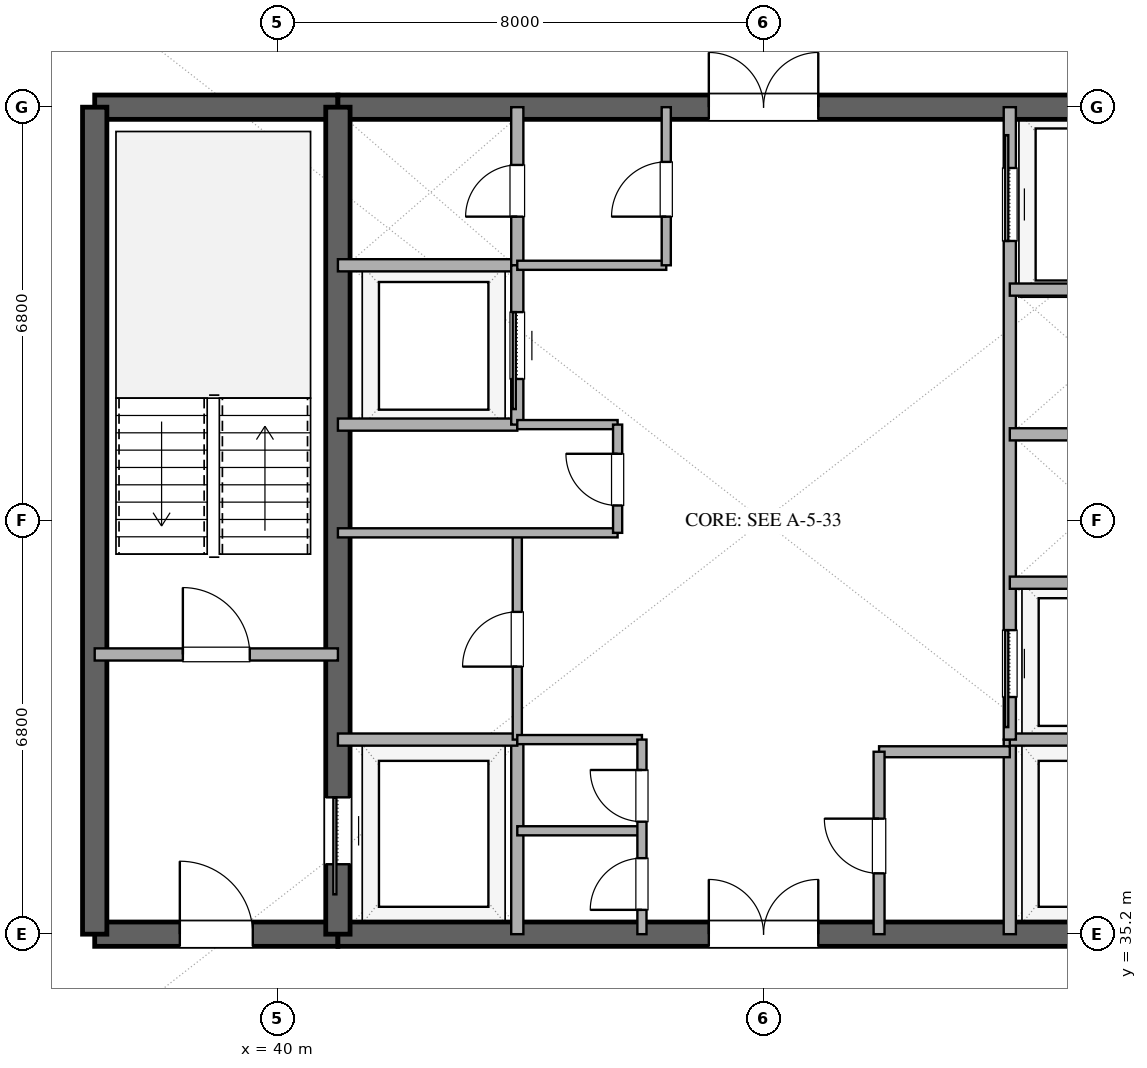
"""IFC4 building model, lengths in metres.
Left out: names, types, materials, properties, quantities, classifications, styles, units other than length and angle.
Written with IfcOpenShell. Run it as: python <this file> out.ifc"""

import sys

from ifc_helpers import new_model, si_unit, direction, frame, frame_2d, origin, place, context, subcontext, project, spatial, rectangle, extrude, element, fill, save


model = new_model("IFC4")
c1 = context("Model", 3, precision=1e-05, world=origin(), true_north=direction((0.0, 1.0)))
c2 = subcontext(c1, "Body", "Model", "MODEL_VIEW")
j1 = project(units=[si_unit("LENGTHUNIT", "METRE"), si_unit("PLANEANGLEUNIT", "RADIAN")], contexts=[c1])
p1 = place(None, origin())
s1 = spatial("IfcSite", under=j1, at=p1, CompositionType="ELEMENT")
p2 = place(p1, origin())
s2 = spatial("IfcBuilding", under=s1, at=p2, CompositionType="ELEMENT")
p3 = place(p2, frame((0.0, 0.0, 224.4)))
s3 = spatial("IfcBuildingStorey", under=s2, at=p3, CompositionType="ELEMENT", Elevation=224.4)
p4 = place(p3, frame((37.0, 35.2, 0.0), z_axis=(0.0, 0.0, 1.0), x_axis=(1.0, 0.0, 0.0)))
e1 = element("IfcWall", 1, at=p4, inside=s3, PredefinedType="SHEAR", context=c2, shape_type="SweptSolid", body=[
    extrude(rectangle(XDim=4.0, YDim=0.4, at=frame_2d((2.0, 0.0))), origin(), (0.0, 0.0, 1.0), 3.36),
])
p5 = place(p4, frame((1.4, 0.0, 0.0)))
e2 = element("IfcOpeningElement", 2, at=p5, cuts=e1, PredefinedType="OPENING", context=c2, shape_type="SweptSolid", body=[
    extrude(rectangle(XDim=1.2, YDim=2.15, at=frame_2d((0.6, 1.075))), frame((0.0, 0.21, 0.0), z_axis=(0.0, -1.0, 0.0), x_axis=(1.0, 0.0, 0.0)), (0.0, 0.0, 1.0), 0.42),
])
p6 = place(p3, frame((41.0, 35.2, 0.0), z_axis=(0.0, 0.0, 1.0), x_axis=(1.0, 0.0, 0.0)))
e3 = element("IfcWall", 3, at=p6, inside=s3, PredefinedType="SHEAR", context=c2, shape_type="SweptSolid", body=[
    extrude(rectangle(XDim=14.0, YDim=0.4, at=frame_2d((7.0, 0.0))), origin(), (0.0, 0.0, 1.0), 3.36),
])
p7 = place(p6, frame((6.1, 0.0, 0.0)))
e4 = element("IfcOpeningElement", 4, at=p7, cuts=e3, PredefinedType="OPENING", context=c2, shape_type="SweptSolid", body=[
    extrude(rectangle(XDim=1.8, YDim=2.25, at=frame_2d((0.9, 1.125))), frame((0.0, 0.21, 0.0), z_axis=(0.0, -1.0, 0.0), x_axis=(1.0, 0.0, 0.0)), (0.0, 0.0, 1.0), 0.42),
])
p8 = place(p3, frame((37.0, 48.8, 0.0), z_axis=(0.0, 0.0, 1.0), x_axis=(1.0, 0.0, 0.0)))
e5 = element("IfcWall", 5, at=p8, inside=s3, PredefinedType="SHEAR", context=c2, shape_type="SweptSolid", body=[
    extrude(rectangle(XDim=4.0, YDim=0.4, at=frame_2d((2.0, 0.0))), origin(), (0.0, 0.0, 1.0), 3.36),
])
p9 = place(p3, frame((41.0, 48.8, 0.0), z_axis=(0.0, 0.0, 1.0), x_axis=(1.0, 0.0, 0.0)))
e6 = element("IfcWall", 6, at=p9, inside=s3, PredefinedType="SHEAR", context=c2, shape_type="SweptSolid", body=[
    extrude(rectangle(XDim=14.0, YDim=0.4, at=frame_2d((7.0, 0.0))), origin(), (0.0, 0.0, 1.0), 3.36),
])
p10 = place(p9, frame((6.1, 0.0, 0.0)))
e7 = element("IfcOpeningElement", 7, at=p10, cuts=e6, PredefinedType="OPENING", context=c2, shape_type="SweptSolid", body=[
    extrude(rectangle(XDim=1.8, YDim=2.25, at=frame_2d((0.9, 1.125))), frame((0.0, 0.21, 0.0), z_axis=(0.0, -1.0, 0.0), x_axis=(1.0, 0.0, 0.0)), (0.0, 0.0, 1.0), 0.42),
])
p11 = place(p3, frame((37.0, 35.2, 0.0), z_axis=(0.0, 0.0, 1.0), x_axis=(0.0, 1.0, 0.0)))
e8 = element("IfcWall", 8, at=p11, inside=s3, PredefinedType="SHEAR", context=c2, shape_type="SweptSolid", body=[
    extrude(rectangle(XDim=13.6, YDim=0.4, at=frame_2d((6.8, 0.0))), origin(), (0.0, 0.0, 1.0), 3.36),
])
p12 = place(p3, frame((41.0, 35.2, 0.0), z_axis=(0.0, 0.0, 1.0), x_axis=(0.0, 1.0, 0.0)))
e9 = element("IfcWall", 9, at=p12, inside=s3, PredefinedType="SHEAR", context=c2, shape_type="SweptSolid", body=[
    extrude(rectangle(XDim=13.6, YDim=0.4, at=frame_2d((6.8, 0.0))), origin(), (0.0, 0.0, 1.0), 3.36),
])
p13 = place(p12, frame((1.15, 0.0, 0.0)))
e10 = element("IfcOpeningElement", 10, at=p13, cuts=e9, PredefinedType="OPENING", context=c2, shape_type="SweptSolid", body=[
    extrude(rectangle(XDim=1.1, YDim=2.2, at=frame_2d((0.55, 1.1))), frame((0.0, 0.21, 0.0), z_axis=(0.0, -1.0, 0.0), x_axis=(1.0, 0.0, 0.0)), (0.0, 0.0, 1.0), 0.42),
])
p14 = place(p3, frame((37.0, 39.8, 0.0), z_axis=(0.0, 0.0, 1.0), x_axis=(1.0, 0.0, 0.0)))
e11 = element("IfcWall", 11, at=p14, inside=s3, PredefinedType="SOLIDWALL", context=c2, shape_type="SweptSolid", body=[
    extrude(rectangle(XDim=4.0, YDim=0.2, at=frame_2d((2.0, 0.0))), origin(), (0.0, 0.0, 1.0), 2.72),
])
p15 = place(p14, frame((1.45, 0.0, 0.0)))
e12 = element("IfcOpeningElement", 12, at=p15, cuts=e11, PredefinedType="OPENING", context=c2, shape_type="SweptSolid", body=[
    extrude(rectangle(XDim=1.1, YDim=2.15, at=frame_2d((0.55, 1.075))), frame((0.0, 0.11, 0.0), z_axis=(0.0, -1.0, 0.0), x_axis=(1.0, 0.0, 0.0)), (0.0, 0.0, 1.0), 0.22),
])
p16 = place(p3, frame((43.95, 35.2, 0.0), z_axis=(0.0, 0.0, 1.0), x_axis=(0.0, 1.0, 0.0)))
e13 = element("IfcWall", 13, at=p16, inside=s3, PredefinedType="SOLIDWALL", context=c2, shape_type="SweptSolid", body=[
    extrude(rectangle(XDim=3.2, YDim=0.2, at=frame_2d((1.6, 0.0))), origin(), (0.0, 0.0, 1.0), 2.72),
])
p17 = place(p3, frame((41.0, 38.4, 0.0), z_axis=(0.0, 0.0, 1.0), x_axis=(1.0, 0.0, 0.0)))
e14 = element("IfcWall", 14, at=p17, inside=s3, PredefinedType="SOLIDWALL", context=c2, shape_type="SweptSolid", body=[
    extrude(rectangle(XDim=2.95, YDim=0.2, at=frame_2d((1.475, 0.0))), origin(), (0.0, 0.0, 1.0), 2.72),
])
p18 = place(p3, frame((52.05, 35.2, 0.0), z_axis=(0.0, 0.0, 1.0), x_axis=(0.0, 1.0, 0.0)))
e15 = element("IfcWall", 15, at=p18, inside=s3, PredefinedType="SOLIDWALL", context=c2, shape_type="SweptSolid", body=[
    extrude(rectangle(XDim=3.2, YDim=0.2, at=frame_2d((1.6, 0.0))), origin(), (0.0, 0.0, 1.0), 2.72),
])
for number, where, z_axis, x_axis in (
    (16, (52.05, 38.4, 0.0), (0.0, 0.0, 1.0), (1.0, 0.0, 0.0)),
    (17, (41.0, 46.2, 0.0), (0.0, 0.0, 1.0), (1.0, 0.0, 0.0)),
):
    element("IfcWall", number, at=place(p3, frame(where, z_axis=z_axis, x_axis=x_axis)), inside=s3, PredefinedType="SOLIDWALL", context=c2, shape_type="SweptSolid", body=[
        extrude(rectangle(XDim=2.95, YDim=0.2, at=frame_2d((1.475, 0.0))), origin(), (0.0, 0.0, 1.0), 2.72),
    ])
p19 = place(p3, frame((43.95, 46.2, 0.0), z_axis=(0.0, 0.0, 1.0), x_axis=(0.0, 1.0, 0.0)))
e18 = element("IfcWall", 18, at=p19, inside=s3, PredefinedType="SOLIDWALL", context=c2, shape_type="SweptSolid", body=[
    extrude(rectangle(XDim=2.6, YDim=0.2, at=frame_2d((1.3, 0.0))), origin(), (0.0, 0.0, 1.0), 2.72),
])
p20 = place(p19, frame((0.8, 0.0, 0.0)))
e19 = element("IfcOpeningElement", 19, at=p20, cuts=e18, PredefinedType="OPENING", context=c2, shape_type="SweptSolid", body=[
    extrude(rectangle(XDim=0.85, YDim=2.15, at=frame_2d((0.425, 1.075))), frame((0.0, 0.11, 0.0), z_axis=(0.0, -1.0, 0.0), x_axis=(1.0, 0.0, 0.0)), (0.0, 0.0, 1.0), 0.22),
])
p21 = place(p3, frame((41.0, 43.58, 0.0), z_axis=(0.0, 0.0, 1.0), x_axis=(1.0, 0.0, 0.0)))
e20 = element("IfcWall", 20, at=p21, inside=s3, PredefinedType="SOLIDWALL", context=c2, shape_type="SweptSolid", body=[
    extrude(rectangle(XDim=2.95, YDim=0.2, at=frame_2d((1.475, 0.0))), origin(), (0.0, 0.0, 1.0), 2.72),
])
p22 = place(p3, frame((43.95, 43.58, 0.0), z_axis=(0.0, 0.0, 1.0), x_axis=(0.0, 1.0, 0.0)))
e21 = element("IfcWall", 21, at=p22, inside=s3, PredefinedType="SOLIDWALL", context=c2, shape_type="SweptSolid", body=[
    extrude(rectangle(XDim=2.62, YDim=0.2, at=frame_2d((1.31, 0.0))), origin(), (0.0, 0.0, 1.0), 2.72),
])
p23 = place(p22, frame((0.75, 0.0, 0.0)))
e22 = element("IfcOpeningElement", 22, at=p23, cuts=e21, PredefinedType="OPENING", context=c2, shape_type="SweptSolid", body=[
    extrude(rectangle(XDim=1.1, YDim=2.2, at=frame_2d((0.55, 1.1))), frame((0.0, 0.11, 0.0), z_axis=(0.0, -1.0, 0.0), x_axis=(1.0, 0.0, 0.0)), (0.0, 0.0, 1.0), 0.22),
])
p24 = place(p3, frame((43.95, 38.4, 0.0), z_axis=(0.0, 0.0, 1.0), x_axis=(0.0, 1.0, 0.0)))
e23 = element("IfcWall", 23, at=p24, inside=s3, PredefinedType="PARTITIONING", context=c2, shape_type="SweptSolid", body=[
    extrude(rectangle(XDim=3.4, YDim=0.15, at=frame_2d((1.7, 0.0))), origin(), (0.0, 0.0, 1.0), 2.72),
])
p25 = place(p24, frame((1.2, 0.0, 0.0)))
e24 = element("IfcOpeningElement", 24, at=p25, cuts=e23, PredefinedType="OPENING", context=c2, shape_type="SweptSolid", body=[
    extrude(rectangle(XDim=0.9, YDim=2.15, at=frame_2d((0.45, 1.075))), frame((0.0, 0.085, 0.0), z_axis=(0.0, -1.0, 0.0), x_axis=(1.0, 0.0, 0.0)), (0.0, 0.0, 1.0), 0.17),
])
p26 = place(p3, frame((41.0, 41.8, 0.0), z_axis=(0.0, 0.0, 1.0), x_axis=(1.0, 0.0, 0.0)))
e25 = element("IfcWall", 25, at=p26, inside=s3, PredefinedType="PARTITIONING", context=c2, shape_type="SweptSolid", body=[
    extrude(rectangle(XDim=4.6, YDim=0.15, at=frame_2d((2.3, 0.0))), origin(), (0.0, 0.0, 1.0), 2.72),
])
p27 = place(p3, frame((43.95, 43.58, 0.0), z_axis=(0.0, 0.0, 1.0), x_axis=(1.0, 0.0, 0.0)))
e26 = element("IfcWall", 26, at=p27, inside=s3, PredefinedType="PARTITIONING", context=c2, shape_type="SweptSolid", body=[
    extrude(rectangle(XDim=1.65, YDim=0.15, at=frame_2d((0.825, 0.0))), origin(), (0.0, 0.0, 1.0), 2.72),
])
p28 = place(p3, frame((45.6, 41.8, 0.0), z_axis=(0.0, 0.0, 1.0), x_axis=(0.0, 1.0, 0.0)))
e27 = element("IfcWall", 27, at=p28, inside=s3, PredefinedType="PARTITIONING", context=c2, shape_type="SweptSolid", body=[
    extrude(rectangle(XDim=1.78, YDim=0.15, at=frame_2d((0.89, 0.0))), origin(), (0.0, 0.0, 1.0), 2.72),
])
p29 = place(p28, frame((0.45, 0.0, 0.0)))
e28 = element("IfcOpeningElement", 28, at=p29, cuts=e27, PredefinedType="OPENING", context=c2, shape_type="SweptSolid", body=[
    extrude(rectangle(XDim=0.85, YDim=2.15, at=frame_2d((0.425, 1.075))), frame((0.0, 0.085, 0.0), z_axis=(0.0, -1.0, 0.0), x_axis=(1.0, 0.0, 0.0)), (0.0, 0.0, 1.0), 0.17),
])
p30 = place(p3, frame((52.05, 38.4, 0.0), z_axis=(0.0, 0.0, 1.0), x_axis=(0.0, 1.0, 0.0)))
e29 = element("IfcWall", 29, at=p30, inside=s3, PredefinedType="SOLIDWALL", context=c2, shape_type="SweptSolid", body=[
    extrude(rectangle(XDim=10.4, YDim=0.2, at=frame_2d((5.2, 0.0))), origin(), (0.0, 0.0, 1.0), 2.72),
])
p31 = place(p30, frame((0.7, 0.0, 0.0)))
e30 = element("IfcOpeningElement", 30, at=p31, cuts=e29, PredefinedType="OPENING", context=c2, shape_type="SweptSolid", body=[
    extrude(rectangle(XDim=1.1, YDim=2.2, at=frame_2d((0.55, 1.1))), frame((0.0, 0.11, 0.0), z_axis=(0.0, -1.0, 0.0), x_axis=(1.0, 0.0, 0.0)), (0.0, 0.0, 1.0), 0.22),
])
p32 = place(p30, frame((8.2, 0.0, 0.0)))
e31 = element("IfcOpeningElement", 31, at=p32, cuts=e29, PredefinedType="OPENING", context=c2, shape_type="SweptSolid", body=[
    extrude(rectangle(XDim=1.2, YDim=2.2, at=frame_2d((0.6, 1.1))), frame((0.0, 0.11, 0.0), z_axis=(0.0, -1.0, 0.0), x_axis=(1.0, 0.0, 0.0)), (0.0, 0.0, 1.0), 0.22),
])
for number, where, z_axis, x_axis in (
    (32, (52.05, 40.98, 0.0), (0.0, 0.0, 1.0), (1.0, 0.0, 0.0)),
    (33, (52.05, 43.42, 0.0), (0.0, 0.0, 1.0), (1.0, 0.0, 0.0)),
    (34, (52.05, 45.8, 0.0), (0.0, 0.0, 1.0), (1.0, 0.0, 0.0)),
):
    element("IfcWall", number, at=place(p3, frame(where, z_axis=z_axis, x_axis=x_axis)), inside=s3, PredefinedType="SOLIDWALL", context=c2, shape_type="SweptSolid", body=[
        extrude(rectangle(XDim=2.95, YDim=0.2, at=frame_2d((1.475, 0.0))), origin(), (0.0, 0.0, 1.0), 2.72),
    ])
for number, where, z_axis, x_axis in (
    (35, (43.95, 36.9, 0.0), (0.0, 0.0, 1.0), (1.0, 0.0, 0.0)),
    (36, (43.95, 38.4, 0.0), (0.0, 0.0, 1.0), (1.0, 0.0, 0.0)),
):
    element("IfcWall", number, at=place(p3, frame(where, z_axis=z_axis, x_axis=x_axis)), inside=s3, PredefinedType="PARTITIONING", context=c2, shape_type="SweptSolid", body=[
        extrude(rectangle(XDim=2.05, YDim=0.15, at=frame_2d((1.025, 0.0))), origin(), (0.0, 0.0, 1.0), 2.72),
    ])
p33 = place(p3, frame((46.0, 35.2, 0.0), z_axis=(0.0, 0.0, 1.0), x_axis=(0.0, 1.0, 0.0)))
e37 = element("IfcWall", 37, at=p33, inside=s3, PredefinedType="PARTITIONING", context=c2, shape_type="SweptSolid", body=[
    extrude(rectangle(XDim=3.2, YDim=0.15, at=frame_2d((1.6, 0.0))), origin(), (0.0, 0.0, 1.0), 2.72),
])
p34 = place(p33, frame((0.4, 0.0, 0.0)))
e38 = element("IfcOpeningElement", 38, at=p34, cuts=e37, PredefinedType="OPENING", context=c2, shape_type="SweptSolid", body=[
    extrude(rectangle(XDim=0.85, YDim=2.15, at=frame_2d((0.425, 1.075))), frame((0.0, 0.085, 0.0), z_axis=(0.0, -1.0, 0.0), x_axis=(1.0, 0.0, 0.0)), (0.0, 0.0, 1.0), 0.17),
])
p35 = place(p33, frame((1.85, 0.0, 0.0)))
e39 = element("IfcOpeningElement", 39, at=p35, cuts=e37, PredefinedType="OPENING", context=c2, shape_type="SweptSolid", body=[
    extrude(rectangle(XDim=0.85, YDim=2.15, at=frame_2d((0.425, 1.075))), frame((0.0, 0.085, 0.0), z_axis=(0.0, -1.0, 0.0), x_axis=(1.0, 0.0, 0.0)), (0.0, 0.0, 1.0), 0.17),
])
p36 = place(p3, frame((43.95, 46.2, 0.0), z_axis=(0.0, 0.0, 1.0), x_axis=(1.0, 0.0, 0.0)))
e40 = element("IfcWall", 40, at=p36, inside=s3, PredefinedType="PARTITIONING", context=c2, shape_type="SweptSolid", body=[
    extrude(rectangle(XDim=2.45, YDim=0.15, at=frame_2d((1.225, 0.0))), origin(), (0.0, 0.0, 1.0), 2.72),
])
p37 = place(p3, frame((46.4, 46.2, 0.0), z_axis=(0.0, 0.0, 1.0), x_axis=(0.0, 1.0, 0.0)))
e41 = element("IfcWall", 41, at=p37, inside=s3, PredefinedType="PARTITIONING", context=c2, shape_type="SweptSolid", body=[
    extrude(rectangle(XDim=2.6, YDim=0.15, at=frame_2d((1.3, 0.0))), origin(), (0.0, 0.0, 1.0), 2.72),
])
p38 = place(p37, frame((0.8, 0.0, 0.0)))
e42 = element("IfcOpeningElement", 42, at=p38, cuts=e41, PredefinedType="OPENING", context=c2, shape_type="SweptSolid", body=[
    extrude(rectangle(XDim=0.9, YDim=2.15, at=frame_2d((0.45, 1.075))), frame((0.0, 0.085, 0.0), z_axis=(0.0, -1.0, 0.0), x_axis=(1.0, 0.0, 0.0)), (0.0, 0.0, 1.0), 0.17),
])
p39 = place(p3, frame((49.9, 38.2, 0.0), z_axis=(0.0, 0.0, 1.0), x_axis=(1.0, 0.0, 0.0)))
e43 = element("IfcWall", 43, at=p39, inside=s3, PredefinedType="PLUMBINGWALL", context=c2, shape_type="SweptSolid", body=[
    extrude(rectangle(XDim=2.15, YDim=0.18, at=frame_2d((1.075, 0.0))), origin(), (0.0, 0.0, 1.0), 2.72),
])
p40 = place(p3, frame((49.9, 35.2, 0.0), z_axis=(0.0, 0.0, 1.0), x_axis=(0.0, 1.0, 0.0)))
e44 = element("IfcWall", 44, at=p40, inside=s3, PredefinedType="PLUMBINGWALL", context=c2, shape_type="SweptSolid", body=[
    extrude(rectangle(XDim=3.0, YDim=0.18, at=frame_2d((1.5, 0.0))), origin(), (0.0, 0.0, 1.0), 2.72),
])
p41 = place(p40, frame((1.0, 0.0, 0.0)))
e45 = element("IfcOpeningElement", 45, at=p41, cuts=e44, PredefinedType="OPENING", context=c2, shape_type="SweptSolid", body=[
    extrude(rectangle(XDim=0.9, YDim=2.1, at=frame_2d((0.45, 1.05))), frame((0.0, 0.1, 0.0), z_axis=(0.0, -1.0, 0.0), x_axis=(1.0, 0.0, 0.0)), (0.0, 0.0, 1.0), 0.2),
])
p42 = place(p13, origin())
e46 = element("IfcDoor", 46, at=p42, inside=s3, OperationType="SLIDING_TO_LEFT", PredefinedType="DOOR", context=c2, shape_type="SweptSolid", body=[
    extrude(rectangle(XDim=1.1, YDim=2.2, at=frame_2d((0.55, 1.1))), frame((0.0, 0.025, 0.0), z_axis=(0.0, -1.0, 0.0), x_axis=(1.0, 0.0, 0.0)), (0.0, 0.0, 1.0), 0.05),
])
fill(e10, e46)
p43 = place(p5, origin())
e47 = element("IfcDoor", 47, at=p43, inside=s3, OperationType="SINGLE_SWING_LEFT", PredefinedType="DOOR", context=c2, shape_type="SweptSolid", body=[
    extrude(rectangle(XDim=1.2, YDim=2.15, at=frame_2d((0.6, 1.075))), frame((0.0, 0.025, 0.0), z_axis=(0.0, -1.0, 0.0), x_axis=(1.0, 0.0, 0.0)), (0.0, 0.0, 1.0), 0.05),
])
fill(e2, e47)
p44 = place(p7, origin())
e48 = element("IfcDoor", 48, at=p44, inside=s3, OperationType="DOUBLE_DOOR_SINGLE_SWING", PredefinedType="DOOR", context=c2, shape_type="SweptSolid", body=[
    extrude(rectangle(XDim=1.8, YDim=2.25, at=frame_2d((0.9, 1.125))), frame((0.0, 0.025, 0.0), z_axis=(0.0, -1.0, 0.0), x_axis=(1.0, 0.0, 0.0)), (0.0, 0.0, 1.0), 0.05),
])
fill(e4, e48)
p45 = place(p10, origin())
e49 = element("IfcDoor", 49, at=p45, inside=s3, OperationType="DOUBLE_DOOR_SINGLE_SWING", PredefinedType="DOOR", context=c2, shape_type="SweptSolid", body=[
    extrude(rectangle(XDim=1.8, YDim=2.25, at=frame_2d((0.9, 1.125))), frame((0.0, 0.025, 0.0), z_axis=(0.0, -1.0, 0.0), x_axis=(1.0, 0.0, 0.0)), (0.0, 0.0, 1.0), 0.05),
])
fill(e7, e49)
p46 = place(p15, origin())
e50 = element("IfcDoor", 50, at=p46, inside=s3, OperationType="SINGLE_SWING_LEFT", PredefinedType="DOOR", context=c2, shape_type="SweptSolid", body=[
    extrude(rectangle(XDim=1.1, YDim=2.15, at=frame_2d((0.55, 1.075))), frame((0.0, 0.025, 0.0), z_axis=(0.0, -1.0, 0.0), x_axis=(1.0, 0.0, 0.0)), (0.0, 0.0, 1.0), 0.05),
])
fill(e12, e50)
p47 = place(p20, origin())
e51 = element("IfcDoor", 51, at=p47, inside=s3, OperationType="SINGLE_SWING_LEFT", PredefinedType="DOOR", context=c2, shape_type="SweptSolid", body=[
    extrude(rectangle(XDim=0.85, YDim=2.15, at=frame_2d((0.425, 1.075))), frame((0.0, 0.025, 0.0), z_axis=(0.0, -1.0, 0.0), x_axis=(1.0, 0.0, 0.0)), (0.0, 0.0, 1.0), 0.05),
])
fill(e19, e51)
p48 = place(p23, origin())
e52 = element("IfcDoor", 52, at=p48, inside=s3, OperationType="SLIDING_TO_LEFT", PredefinedType="DOOR", context=c2, shape_type="SweptSolid", body=[
    extrude(rectangle(XDim=1.1, YDim=2.2, at=frame_2d((0.55, 1.1))), frame((0.0, 0.025, 0.0), z_axis=(0.0, -1.0, 0.0), x_axis=(1.0, 0.0, 0.0)), (0.0, 0.0, 1.0), 0.05),
])
fill(e22, e52)
p49 = place(p25, origin())
e53 = element("IfcDoor", 53, at=p49, inside=s3, OperationType="SINGLE_SWING_LEFT", PredefinedType="DOOR", context=c2, shape_type="SweptSolid", body=[
    extrude(rectangle(XDim=0.9, YDim=2.15, at=frame_2d((0.45, 1.075))), frame((0.0, 0.025, 0.0), z_axis=(0.0, -1.0, 0.0), x_axis=(1.0, 0.0, 0.0)), (0.0, 0.0, 1.0), 0.05),
])
fill(e24, e53)
p50 = place(p29, origin())
e54 = element("IfcDoor", 54, at=p50, inside=s3, OperationType="SINGLE_SWING_RIGHT", PredefinedType="DOOR", context=c2, shape_type="SweptSolid", body=[
    extrude(rectangle(XDim=0.85, YDim=2.15, at=frame_2d((0.425, 1.075))), frame((0.0, 0.025, 0.0), z_axis=(0.0, -1.0, 0.0), x_axis=(1.0, 0.0, 0.0)), (0.0, 0.0, 1.0), 0.05),
])
fill(e28, e54)
p51 = place(p31, origin())
e55 = element("IfcDoor", 55, at=p51, inside=s3, OperationType="SLIDING_TO_LEFT", PredefinedType="DOOR", context=c2, shape_type="SweptSolid", body=[
    extrude(rectangle(XDim=1.1, YDim=2.2, at=frame_2d((0.55, 1.1))), frame((0.0, 0.025, 0.0), z_axis=(0.0, -1.0, 0.0), x_axis=(1.0, 0.0, 0.0)), (0.0, 0.0, 1.0), 0.05),
])
fill(e30, e55)
p52 = place(p32, origin())
e56 = element("IfcDoor", 56, at=p52, inside=s3, OperationType="SLIDING_TO_RIGHT", PredefinedType="DOOR", context=c2, shape_type="SweptSolid", body=[
    extrude(rectangle(XDim=1.2, YDim=2.2, at=frame_2d((0.6, 1.1))), frame((0.0, 0.025, 0.0), z_axis=(0.0, -1.0, 0.0), x_axis=(1.0, 0.0, 0.0)), (0.0, 0.0, 1.0), 0.05),
])
fill(e31, e56)
p53 = place(p34, origin())
e57 = element("IfcDoor", 57, at=p53, inside=s3, OperationType="SINGLE_SWING_LEFT", PredefinedType="DOOR", context=c2, shape_type="SweptSolid", body=[
    extrude(rectangle(XDim=0.85, YDim=2.15, at=frame_2d((0.425, 1.075))), frame((0.0, 0.025, 0.0), z_axis=(0.0, -1.0, 0.0), x_axis=(1.0, 0.0, 0.0)), (0.0, 0.0, 1.0), 0.05),
])
fill(e38, e57)
p54 = place(p35, origin())
e58 = element("IfcDoor", 58, at=p54, inside=s3, OperationType="SINGLE_SWING_RIGHT", PredefinedType="DOOR", context=c2, shape_type="SweptSolid", body=[
    extrude(rectangle(XDim=0.85, YDim=2.15, at=frame_2d((0.425, 1.075))), frame((0.0, 0.025, 0.0), z_axis=(0.0, -1.0, 0.0), x_axis=(1.0, 0.0, 0.0)), (0.0, 0.0, 1.0), 0.05),
])
fill(e39, e58)
p55 = place(p38, origin())
e59 = element("IfcDoor", 59, at=p55, inside=s3, OperationType="SINGLE_SWING_LEFT", PredefinedType="DOOR", context=c2, shape_type="SweptSolid", body=[
    extrude(rectangle(XDim=0.9, YDim=2.15, at=frame_2d((0.45, 1.075))), frame((0.0, 0.025, 0.0), z_axis=(0.0, -1.0, 0.0), x_axis=(1.0, 0.0, 0.0)), (0.0, 0.0, 1.0), 0.05),
])
fill(e42, e59)
p56 = place(p41, origin())
e60 = element("IfcDoor", 60, at=p56, inside=s3, OperationType="SINGLE_SWING_RIGHT", PredefinedType="DOOR", context=c2, shape_type="SweptSolid", body=[
    extrude(rectangle(XDim=0.9, YDim=2.1, at=frame_2d((0.45, 1.05))), frame((0.0, 0.025, 0.0), z_axis=(0.0, -1.0, 0.0), x_axis=(1.0, 0.0, 0.0)), (0.0, 0.0, 1.0), 0.05),
])
fill(e45, e60)
save(model, sys.argv[1])
